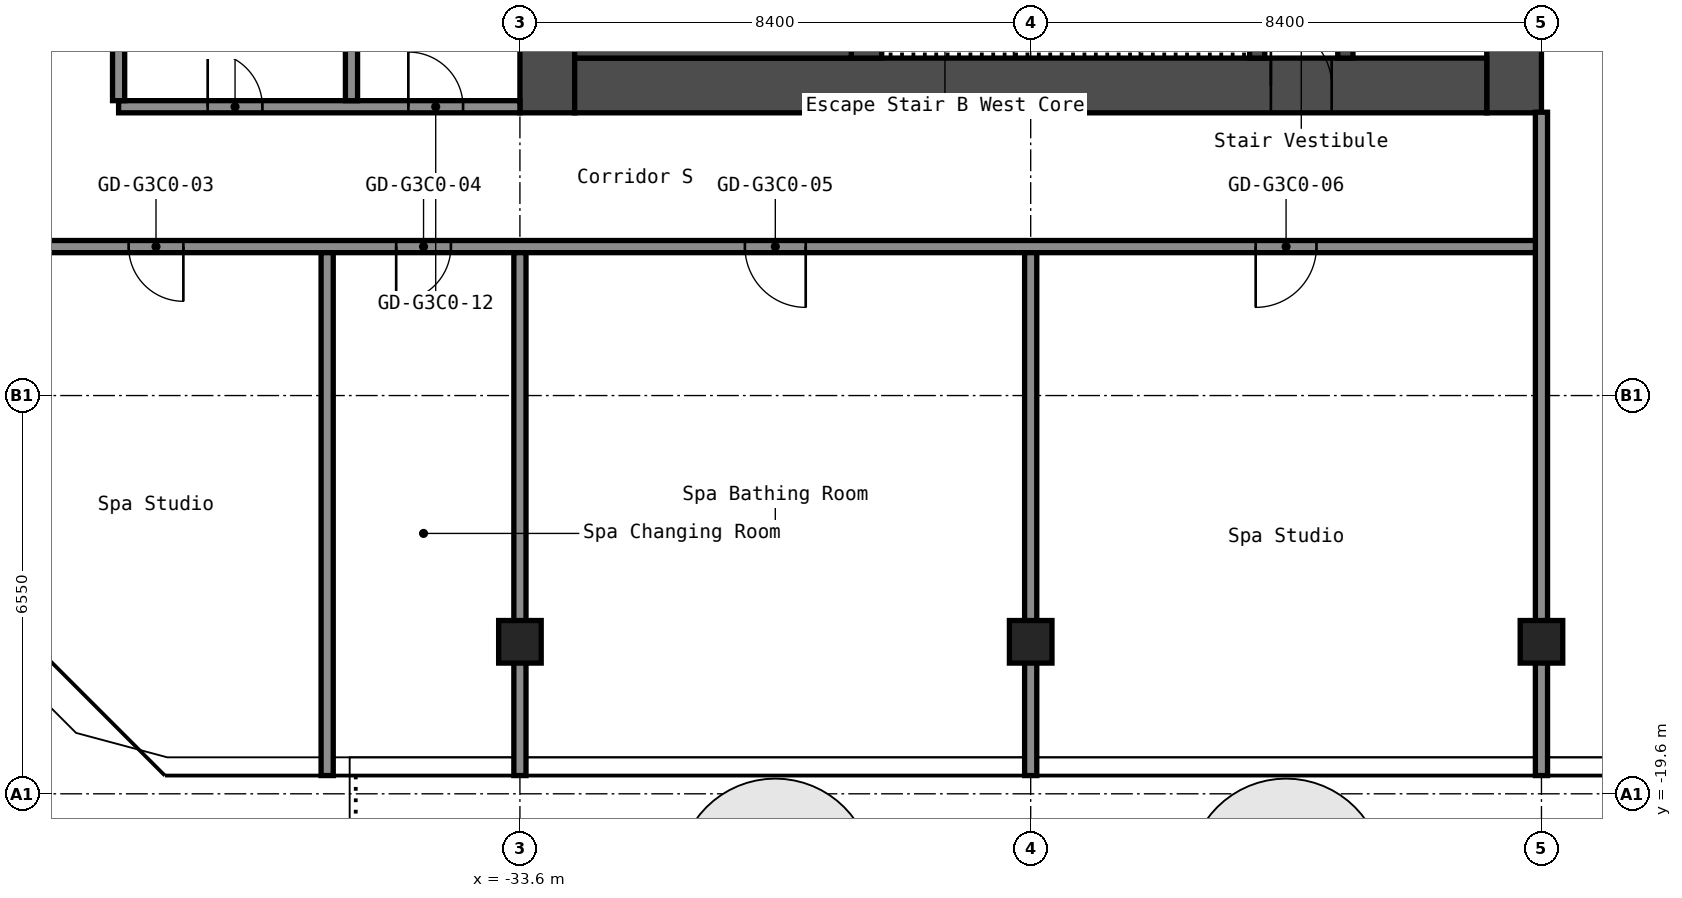
"""IFC4 building model, lengths in metres.
Left out: names, types, materials, properties, quantities, classifications, styles, units other than length and angle.
Written with IfcOpenShell. Run it as: python <this file> out.ifc"""

import sys

from ifc_helpers import new_model, si_unit, direction, frame, frame_2d, origin, origin_2d, place, context, subcontext, project, spatial, rectangle, hollow_rectangle, extrude, element, fill, save


model = new_model("IFC4")
c1 = context("Model", 3, precision=1e-05, world=origin(), true_north=direction((0.0, 1.0)))
c2 = subcontext(c1, "Body", "Model", "MODEL_VIEW")
j1 = project(units=[si_unit("LENGTHUNIT", "METRE"), si_unit("PLANEANGLEUNIT", "RADIAN")], contexts=[c1])
p1 = place(None, origin())
s1 = spatial("IfcSite", under=j1, at=p1, CompositionType="ELEMENT")
p2 = place(p1, origin())
s2 = spatial("IfcBuilding", under=s1, at=p2, CompositionType="ELEMENT")
p3 = place(p2, frame((0.0, 0.0, 137.4)))
s3 = spatial("IfcBuildingStorey", under=s2, at=p3, CompositionType="ELEMENT", Elevation=137.4)
for number, where, z_axis, x_axis in (
    (1, (-33.6, -17.1, 0.0), (0.0, 0.0, 1.0), (1.0, 0.0, 0.0)),
    (2, (-25.2, -17.1, 0.0), (0.0, 0.0, 1.0), (1.0, 0.0, 0.0)),
    (3, (-16.8, -17.1, 0.0), (0.0, 0.0, 1.0), (1.0, 0.0, 0.0)),
):
    element("IfcColumn", number, at=place(p3, frame(where, z_axis=z_axis, x_axis=x_axis)), inside=s3, PredefinedType="COLUMN", context=c2, shape_type="SweptSolid", body=[
        extrude(hollow_rectangle(XDim=0.7, YDim=0.7, WallThickness=0.028, at=origin_2d()), origin(), (0.0, 0.0, 1.0), 2.75),
    ])
p4 = place(p3, frame((-17.25, -8.4, 0.0), z_axis=(0.0, 0.0, 1.0), x_axis=(0.0, 1.0, 0.0)))
e4 = element("IfcWall", 4, at=p4, inside=s3, PredefinedType="SHEAR", context=c2, shape_type="SweptSolid", body=[
    extrude(rectangle(XDim=16.8, YDim=0.9, at=frame_2d((8.4, 0.0))), origin(), (0.0, 0.0, 1.0), 2.75),
])
p5 = place(p4, frame((7.1, 0.0, 0.0)))
e5 = element("IfcOpeningElement", 5, at=p5, cuts=e4, PredefinedType="OPENING", context=c2, shape_type="SweptSolid", body=[
    extrude(rectangle(XDim=1.6, YDim=2.1, at=frame_2d((0.8, 1.05))), frame((0.0, 0.46, 0.0), z_axis=(0.0, -1.0, 0.0), x_axis=(1.0, 0.0, 0.0)), (0.0, 0.0, 1.0), 0.92),
])
p6 = place(p3, frame((-33.15, -8.4, 0.0), z_axis=(0.0, 0.0, 1.0), x_axis=(0.0, 1.0, 0.0)))
e6 = element("IfcWall", 6, at=p6, inside=s3, PredefinedType="SHEAR", context=c2, shape_type="SweptSolid", body=[
    extrude(rectangle(XDim=16.8, YDim=0.9, at=frame_2d((8.4, 0.0))), origin(), (0.0, 0.0, 1.0), 2.75),
])
p7 = place(p3, frame((-32.7, -7.95, 0.0), z_axis=(0.0, 0.0, 1.0), x_axis=(1.0, 0.0, 0.0)))
e7 = element("IfcWall", 7, at=p7, inside=s3, PredefinedType="SHEAR", context=c2, shape_type="SweptSolid", body=[
    extrude(rectangle(XDim=15.0, YDim=0.9, at=frame_2d((7.5, 0.0))), origin(), (0.0, 0.0, 1.0), 2.75),
])
p8 = place(p7, frame((11.45, 0.0, 0.0)))
e8 = element("IfcOpeningElement", 8, at=p8, cuts=e7, PredefinedType="OPENING", context=c2, shape_type="SweptSolid", body=[
    extrude(rectangle(XDim=1.0, YDim=2.1, at=frame_2d((0.5, 1.05))), frame((0.0, 0.46, 0.0), z_axis=(0.0, -1.0, 0.0), x_axis=(1.0, 0.0, 0.0)), (0.0, 0.0, 1.0), 0.92),
])
p9 = place(p3, frame((-20.025, -7.5, 0.0), z_axis=(0.0, 0.0, 1.0), x_axis=(0.0, 1.0, 0.0)))
e9 = element("IfcWall", 9, at=p9, inside=s3, PredefinedType="SHEAR", context=c2, shape_type="SweptSolid", body=[
    extrude(rectangle(XDim=6.3, YDim=0.25, at=frame_2d((3.15, 0.0))), origin(), (0.0, 0.0, 1.0), 2.75),
])
p10 = place(p9, frame((2.4, 0.0, 0.0)))
e10 = element("IfcOpeningElement", 10, at=p10, cuts=e9, PredefinedType="OPENING", context=c2, shape_type="SweptSolid", body=[
    extrude(rectangle(XDim=1.0, YDim=2.1, at=frame_2d((0.5, 1.05))), frame((0.0, 0.135, 0.0), z_axis=(0.0, -1.0, 0.0), x_axis=(1.0, 0.0, 0.0)), (0.0, 0.0, 1.0), 0.27),
])
p11 = place(p3, frame((-21.475, -7.5, 0.0), z_axis=(0.0, 0.0, 1.0), x_axis=(0.0, 1.0, 0.0)))
e11 = element("IfcWall", 11, at=p11, inside=s3, PredefinedType="SHEAR", context=c2, shape_type="SweptSolid", body=[
    extrude(rectangle(XDim=3.75, YDim=0.25, at=frame_2d((1.875, 0.0))), origin(), (0.0, 0.0, 1.0), 2.75),
])
p12 = place(p11, frame((1.3, 0.0, 0.0)))
e12 = element("IfcOpeningElement", 12, at=p12, cuts=e11, PredefinedType="OPENING", context=c2, shape_type="SweptSolid", body=[
    extrude(rectangle(XDim=1.2, YDim=2.1, at=frame_2d((0.6, 1.05))), frame((0.0, 0.135, 0.0), z_axis=(0.0, -1.0, 0.0), x_axis=(1.0, 0.0, 0.0)), (0.0, 0.0, 1.0), 0.27),
])
p13 = place(p3, frame((-27.9, -7.5, 0.0), z_axis=(0.0, 0.0, 1.0), x_axis=(0.0, 1.0, 0.0)))
e13 = element("IfcWall", 13, at=p13, inside=s3, PredefinedType="SHEAR", context=c2, shape_type="SweptSolid", body=[
    extrude(rectangle(XDim=3.75, YDim=0.5, at=frame_2d((1.875, 0.0))), origin(), (0.0, 0.0, 1.0), 2.75),
])
p14 = place(p3, frame((-32.7, -6.75, 0.0), z_axis=(0.0, 0.0, 1.0), x_axis=(1.0, 0.0, 0.0)))
e14 = element("IfcWall", 14, at=p14, inside=s3, PredefinedType="SHEAR", context=c2, shape_type="SweptSolid", body=[
    extrude(rectangle(XDim=4.55, YDim=1.5, at=frame_2d((2.275, 0.0))), origin(), (0.0, 0.0, 1.0), 2.75),
])
p15 = place(p3, frame((-42.7, -10.6, 0.0), z_axis=(0.0, 0.0, 1.0), x_axis=(1.0, 0.0, 0.0)))
e15 = element("IfcWall", 15, at=p15, inside=s3, PredefinedType="PARTITIONING", context=c2, shape_type="SweptSolid", body=[
    extrude(rectangle(XDim=25.9, YDim=0.2, at=frame_2d((12.95, 0.0))), origin(), (0.0, 0.0, 1.0), 2.75),
])
p16 = place(p15, frame((2.665, 0.0, 0.0)))
e16 = element("IfcOpeningElement", 16, at=p16, cuts=e15, PredefinedType="OPENING", context=c2, shape_type="SweptSolid", body=[
    extrude(rectangle(XDim=0.9, YDim=2.1, at=frame_2d((0.45, 1.05))), frame((0.0, 0.11, 0.0), z_axis=(0.0, -1.0, 0.0), x_axis=(1.0, 0.0, 0.0)), (0.0, 0.0, 1.0), 0.22),
])
p17 = place(p15, frame((7.065, 0.0, 0.0)))
e17 = element("IfcOpeningElement", 17, at=p17, cuts=e15, PredefinedType="OPENING", context=c2, shape_type="SweptSolid", body=[
    extrude(rectangle(XDim=0.9, YDim=2.1, at=frame_2d((0.45, 1.05))), frame((0.0, 0.11, 0.0), z_axis=(0.0, -1.0, 0.0), x_axis=(1.0, 0.0, 0.0)), (0.0, 0.0, 1.0), 0.22),
])
p18 = place(p15, frame((12.8, 0.0, 0.0)))
e18 = element("IfcOpeningElement", 18, at=p18, cuts=e15, PredefinedType="OPENING", context=c2, shape_type="SweptSolid", body=[
    extrude(rectangle(XDim=1.0, YDim=2.1, at=frame_2d((0.5, 1.05))), frame((0.0, 0.11, 0.0), z_axis=(0.0, -1.0, 0.0), x_axis=(1.0, 0.0, 0.0)), (0.0, 0.0, 1.0), 0.22),
])
p19 = place(p15, frame((21.2, 0.0, 0.0)))
e19 = element("IfcOpeningElement", 19, at=p19, cuts=e15, PredefinedType="OPENING", context=c2, shape_type="SweptSolid", body=[
    extrude(rectangle(XDim=1.0, YDim=2.1, at=frame_2d((0.5, 1.05))), frame((0.0, 0.11, 0.0), z_axis=(0.0, -1.0, 0.0), x_axis=(1.0, 0.0, 0.0)), (0.0, 0.0, 1.0), 0.22),
])
p20 = place(p3, frame((-40.2, -8.3, 0.0), z_axis=(0.0, 0.0, 1.0), x_axis=(1.0, 0.0, 0.0)))
e20 = element("IfcWall", 20, at=p20, inside=s3, PredefinedType="PARTITIONING", context=c2, shape_type="SweptSolid", body=[
    extrude(rectangle(XDim=6.6, YDim=0.2, at=frame_2d((3.3, 0.0))), origin(), (0.0, 0.0, 1.0), 2.75),
])
p21 = place(p20, frame((1.465, 0.0, 0.0)))
e21 = element("IfcOpeningElement", 21, at=p21, cuts=e20, PredefinedType="OPENING", context=c2, shape_type="SweptSolid", body=[
    extrude(rectangle(XDim=0.9, YDim=2.1, at=frame_2d((0.45, 1.05))), frame((0.0, 0.11, 0.0), z_axis=(0.0, -1.0, 0.0), x_axis=(1.0, 0.0, 0.0)), (0.0, 0.0, 1.0), 0.22),
])
p22 = place(p20, frame((4.765, 0.0, 0.0)))
e22 = element("IfcOpeningElement", 22, at=p22, cuts=e20, PredefinedType="OPENING", context=c2, shape_type="SweptSolid", body=[
    extrude(rectangle(XDim=0.9, YDim=2.1, at=frame_2d((0.45, 1.05))), frame((0.0, 0.11, 0.0), z_axis=(0.0, -1.0, 0.0), x_axis=(1.0, 0.0, 0.0)), (0.0, 0.0, 1.0), 0.22),
])
p23 = place(p3, frame((-40.2, -8.2, 0.0), z_axis=(0.0, 0.0, 1.0), x_axis=(0.0, 1.0, 0.0)))
e23 = element("IfcWall", 23, at=p23, inside=s3, PredefinedType="PARTITIONING", context=c2, shape_type="SweptSolid", body=[
    extrude(rectangle(XDim=16.4, YDim=0.2, at=frame_2d((8.2, 0.0))), origin(), (0.0, 0.0, 1.0), 2.75),
])
p24 = place(p3, frame((-36.77, -19.3, 0.0), z_axis=(0.0, 0.0, 1.0), x_axis=(0.0, 1.0, 0.0)))
e24 = element("IfcWall", 24, at=p24, inside=s3, PredefinedType="PARTITIONING", context=c2, shape_type="SweptSolid", body=[
    extrude(rectangle(XDim=8.6, YDim=0.2, at=frame_2d((4.3, 0.0))), origin(), (0.0, 0.0, 1.0), 2.75),
])
p25 = place(p3, frame((-36.37, -8.2, 0.0), z_axis=(0.0, 0.0, 1.0), x_axis=(0.0, 1.0, 0.0)))
e25 = element("IfcWall", 25, at=p25, inside=s3, PredefinedType="PARTITIONING", context=c2, shape_type="SweptSolid", body=[
    extrude(rectangle(XDim=8.2, YDim=0.2, at=frame_2d((4.1, 0.0))), origin(), (0.0, 0.0, 1.0), 2.75),
])
for number, where, z_axis, x_axis in (
    (26, (-33.6, -19.3, 0.0), (0.0, 0.0, 1.0), (0.0, 1.0, 0.0)),
    (27, (-25.2, -19.3, 0.0), (0.0, 0.0, 1.0), (0.0, 1.0, 0.0)),
):
    element("IfcWall", number, at=place(p3, frame(where, z_axis=z_axis, x_axis=x_axis)), inside=s3, PredefinedType="PARTITIONING", context=c2, shape_type="SweptSolid", body=[
        extrude(rectangle(XDim=8.6, YDim=0.2, at=frame_2d((4.3, 0.0))), origin(), (0.0, 0.0, 1.0), 2.75),
    ])
p26 = place(p3, frame((-16.8, -19.3, 0.0), z_axis=(0.0, 0.0, 1.0), x_axis=(0.0, 1.0, 0.0)))
e28 = element("IfcWall", 28, at=p26, inside=s3, PredefinedType="PARTITIONING", context=c2, shape_type="SweptSolid", body=[
    extrude(rectangle(XDim=10.91, YDim=0.2, at=frame_2d((5.455, 0.0))), origin(), (0.0, 0.0, 1.0), 2.75),
])
p27 = place(p8, origin())
e29 = element("IfcDoor", 29, at=p27, inside=s3, OperationType="SINGLE_SWING_RIGHT", PredefinedType="DOOR", context=c2, shape_type="SweptSolid", body=[
    extrude(rectangle(XDim=1.0, YDim=2.1, at=frame_2d((0.5, 1.05))), frame((0.0, 0.025, 0.0), z_axis=(0.0, -1.0, 0.0), x_axis=(1.0, 0.0, 0.0)), (0.0, 0.0, 1.0), 0.05),
])
fill(e8, e29)
p28 = place(p16, origin())
e30 = element("IfcDoor", 30, at=p28, inside=s3, OperationType="SINGLE_SWING_RIGHT", PredefinedType="DOOR", context=c2, shape_type="SweptSolid", body=[
    extrude(rectangle(XDim=0.9, YDim=2.1, at=frame_2d((0.45, 1.05))), frame((0.0, 0.025, 0.0), z_axis=(0.0, -1.0, 0.0), x_axis=(1.0, 0.0, 0.0)), (0.0, 0.0, 1.0), 0.05),
])
fill(e16, e30)
p29 = place(p17, origin())
e31 = element("IfcDoor", 31, at=p29, inside=s3, OperationType="SINGLE_SWING_LEFT", PredefinedType="DOOR", context=c2, shape_type="SweptSolid", body=[
    extrude(rectangle(XDim=0.9, YDim=2.1, at=frame_2d((0.45, 1.05))), frame((0.0, 0.025, 0.0), z_axis=(0.0, -1.0, 0.0), x_axis=(1.0, 0.0, 0.0)), (0.0, 0.0, 1.0), 0.05),
])
fill(e17, e31)
p30 = place(p18, origin())
e32 = element("IfcDoor", 32, at=p30, inside=s3, OperationType="SINGLE_SWING_RIGHT", PredefinedType="DOOR", context=c2, shape_type="SweptSolid", body=[
    extrude(rectangle(XDim=1.0, YDim=2.1, at=frame_2d((0.5, 1.05))), frame((0.0, 0.025, 0.0), z_axis=(0.0, -1.0, 0.0), x_axis=(1.0, 0.0, 0.0)), (0.0, 0.0, 1.0), 0.05),
])
fill(e18, e32)
p31 = place(p19, origin())
e33 = element("IfcDoor", 33, at=p31, inside=s3, OperationType="SINGLE_SWING_LEFT", PredefinedType="DOOR", context=c2, shape_type="SweptSolid", body=[
    extrude(rectangle(XDim=1.0, YDim=2.1, at=frame_2d((0.5, 1.05))), frame((0.0, 0.025, 0.0), z_axis=(0.0, -1.0, 0.0), x_axis=(1.0, 0.0, 0.0)), (0.0, 0.0, 1.0), 0.05),
])
fill(e19, e33)
p32 = place(p21, origin())
e34 = element("IfcDoor", 34, at=p32, inside=s3, OperationType="SINGLE_SWING_RIGHT", PredefinedType="DOOR", context=c2, shape_type="SweptSolid", body=[
    extrude(rectangle(XDim=0.9, YDim=2.1, at=frame_2d((0.45, 1.05))), frame((0.0, 0.025, 0.0), z_axis=(0.0, -1.0, 0.0), x_axis=(1.0, 0.0, 0.0)), (0.0, 0.0, 1.0), 0.05),
])
fill(e21, e34)
p33 = place(p22, origin())
e35 = element("IfcDoor", 35, at=p33, inside=s3, OperationType="SINGLE_SWING_RIGHT", PredefinedType="DOOR", context=c2, shape_type="SweptSolid", body=[
    extrude(rectangle(XDim=0.9, YDim=2.1, at=frame_2d((0.45, 1.05))), frame((0.0, 0.025, 0.0), z_axis=(0.0, -1.0, 0.0), x_axis=(1.0, 0.0, 0.0)), (0.0, 0.0, 1.0), 0.05),
])
fill(e22, e35)
save(model, sys.argv[1])
